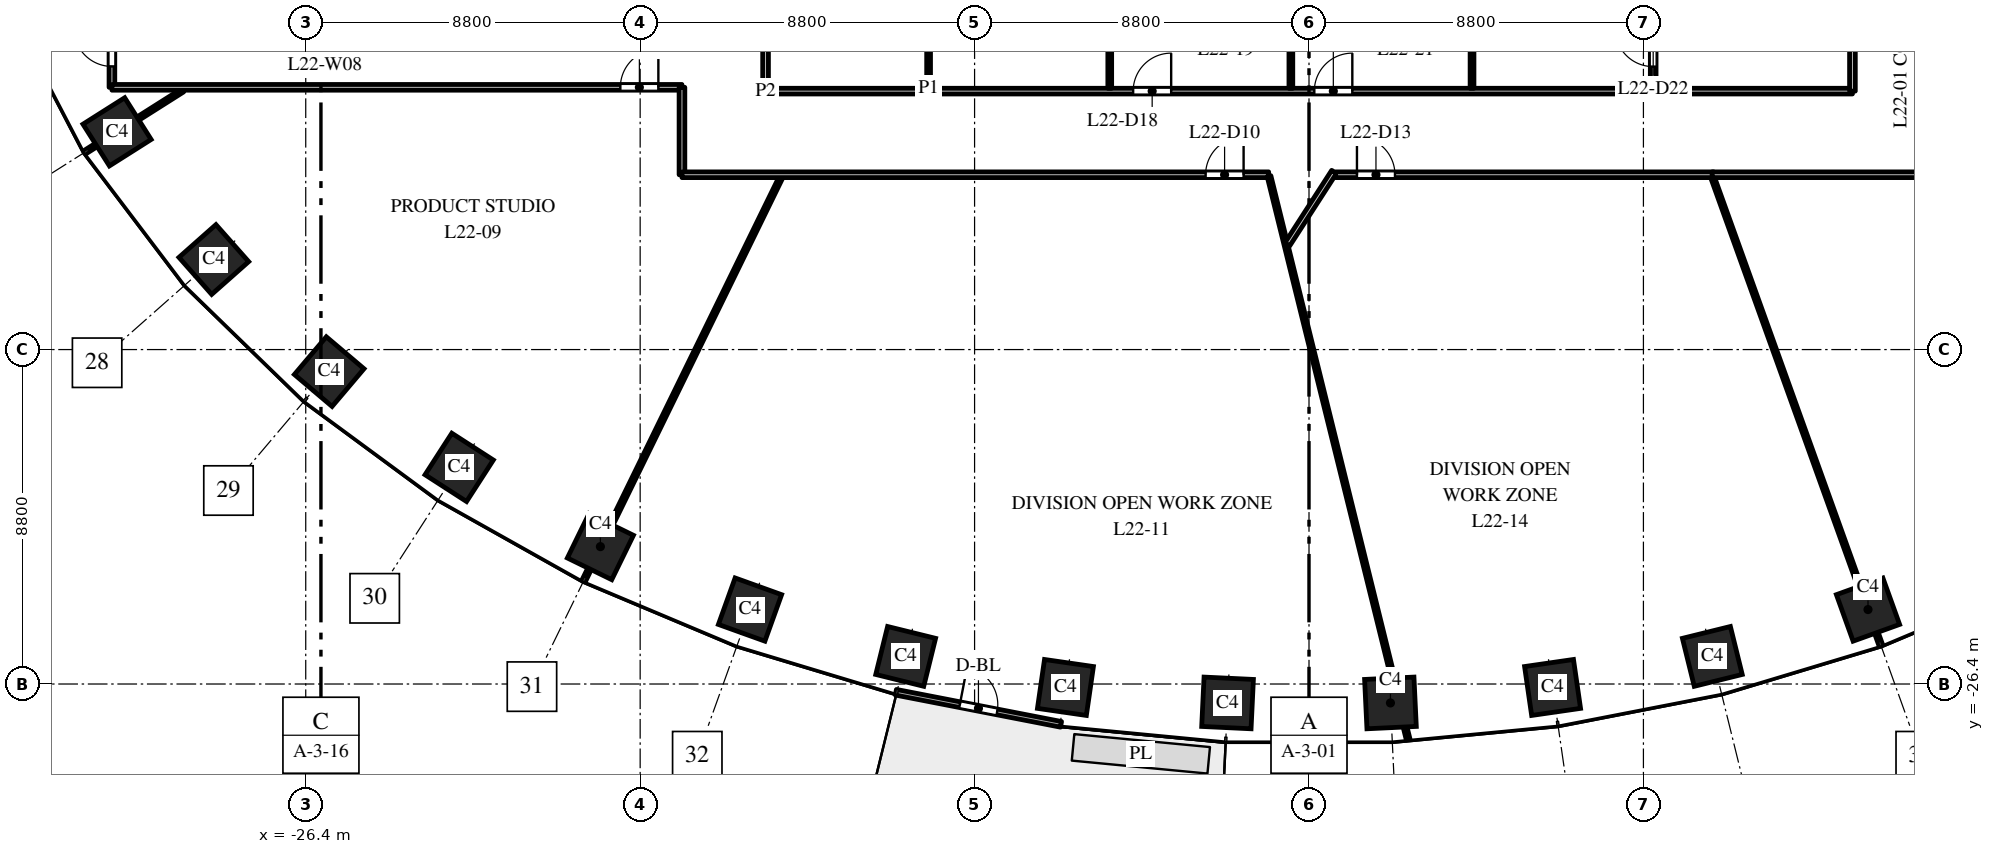
"""IFC4 building model, lengths in metres.
Left out: names, types, materials, properties, quantities, classifications, styles, units other than length and angle.
Written with IfcOpenShell. Run it as: python <this file> out.ifc"""

import sys

from ifc_helpers import new_model, si_unit, direction, frame, frame_2d, origin, origin_2d, place, context, subcontext, project, spatial, rectangle, extrude, element, fill, save


model = new_model("IFC4")
c1 = context("Model", 3, precision=1e-05, world=origin(), true_north=direction((0.0, 1.0)))
c2 = subcontext(c1, "Body", "Model", "MODEL_VIEW")
j1 = project(units=[si_unit("LENGTHUNIT", "METRE"), si_unit("PLANEANGLEUNIT", "RADIAN")], contexts=[c1])
p1 = place(None, origin())
s1 = spatial("IfcSite", under=j1, at=p1, CompositionType="ELEMENT")
p2 = place(p1, origin())
s2 = spatial("IfcBuilding", under=s1, at=p2, CompositionType="ELEMENT")
p3 = place(p2, frame((0.0, 0.0, 100.0)))
s3 = spatial("IfcBuildingStorey", under=s2, at=p3, CompositionType="ELEMENT", Elevation=100.0)
for number, where, z_axis, x_axis in (
    (1, (-31.365, -11.871, 0.0), (0.0, 0.0, 1.0), (0.535, -0.845, 0.0)),
    (2, (-28.819, -15.23, 0.0), (0.0, 0.0, 1.0), (0.663, -0.749, 0.0)),
    (3, (-25.783, -18.18, 0.0), (0.0, 0.0, 1.0), (0.763, -0.646, 0.0)),
    (4, (-22.362, -20.7, 0.0), (0.0, 0.0, 1.0), (0.84, -0.542, 0.0)),
    (5, (-18.646, -22.785, 0.0), (0.0, 0.0, 1.0), (0.898, -0.439, 0.0)),
    (6, (-14.709, -24.441, 0.0), (0.0, 0.0, 1.0), (0.941, -0.338, 0.0)),
    (7, (-10.613, -25.674, 0.0), (0.0, 0.0, 1.0), (0.971, -0.24, 0.0)),
    (8, (-6.409, -26.491, 0.0), (0.0, 0.0, 1.0), (0.99, -0.143, 0.0)),
    (9, (-2.143, -26.898, 0.0), (0.0, 0.0, 1.0), (0.999, -0.048, 0.0)),
    (10, (2.143, -26.898, 0.0), (0.0, 0.0, 1.0), (0.999, 0.048, 0.0)),
    (11, (6.409, -26.491, 0.0), (0.0, 0.0, 1.0), (0.99, 0.143, 0.0)),
    (12, (10.613, -25.674, 0.0), (0.0, 0.0, 1.0), (0.971, 0.24, 0.0)),
    (13, (14.709, -24.441, 0.0), (0.0, 0.0, 1.0), (0.941, 0.338, 0.0)),
):
    element("IfcColumn", number, at=place(p3, frame(where, z_axis=z_axis, x_axis=x_axis)), inside=s3, PredefinedType="COLUMN", context=c2, shape_type="SweptSolid", body=[
        extrude(rectangle(XDim=1.3, YDim=1.3, at=origin_2d()), origin(), (0.0, 0.0, 1.0), 4.0),
    ])
p4 = place(p3, frame((-10.871, -26.617, 0.0), z_axis=(0.0, 0.0, 1.0), x_axis=(0.981631174778, -0.190788460615, 0.0)))
e14 = element("IfcWall", 14, at=p4, inside=s3, PredefinedType="STANDARD", context=c2, shape_type="SweptSolid", body=[
    extrude(rectangle(XDim=4.426, YDim=0.15, at=frame_2d((2.213, 0.0))), origin(), (0.0, 0.0, 1.0), 3.7),
])
p5 = place(p4, frame((1.713, 0.0, 0.0)))
e15 = element("IfcOpeningElement", 15, at=p5, cuts=e14, PredefinedType="OPENING", context=c2, shape_type="SweptSolid", body=[
    extrude(rectangle(XDim=1.0, YDim=2.4, at=frame_2d((0.5, 1.2))), frame((0.0, 0.085, 0.0), z_axis=(0.0, -1.0, 0.0), x_axis=(1.0, 0.0, 0.0)), (0.0, 0.0, 1.0), 0.17),
])
p6 = place(p3, frame((-32.212, -12.408, 0.0), z_axis=(0.0, 0.0, 1.0), x_axis=(0.844810627195, 0.535065420467, 0.0)))
e16 = element("IfcWall", 16, at=p6, inside=s3, PredefinedType="PARTITIONING", context=c2, shape_type="SweptSolid", body=[
    extrude(rectangle(XDim=3.048, YDim=0.1, at=frame_2d((1.524, 0.0))), origin(), (0.0, 0.0, 1.0), 3.7),
])
p7 = place(p3, frame((-31.5, -10.7, 0.0), z_axis=(0.0, 0.0, 1.0), x_axis=(0.0, 1.0, 0.0)))
e17 = element("IfcWall", 17, at=p7, inside=s3, PredefinedType="PARTITIONING", context=c2, shape_type="SweptSolid", body=[
    extrude(rectangle(XDim=2.2, YDim=0.15, at=frame_2d((1.1, 0.0))), origin(), (0.0, 0.0, 1.0), 3.7),
])
p8 = place(p7, frame((0.55, 0.0, 0.0)))
e18 = element("IfcOpeningElement", 18, at=p8, cuts=e17, PredefinedType="OPENING", context=c2, shape_type="SweptSolid", body=[
    extrude(rectangle(XDim=1.0, YDim=2.1, at=frame_2d((0.5, 1.05))), frame((0.0, 0.085, 0.0), z_axis=(0.0, -1.0, 0.0), x_axis=(1.0, 0.0, 0.0)), (0.0, 0.0, 1.0), 0.17),
])
p9 = place(p3, frame((-31.5, -10.7, 0.0), z_axis=(0.0, 0.0, 1.0), x_axis=(1.0, 0.0, 0.0)))
e19 = element("IfcWall", 19, at=p9, inside=s3, PredefinedType="PARTITIONING", context=c2, shape_type="SweptSolid", body=[
    extrude(rectangle(XDim=15.0, YDim=0.15, at=frame_2d((7.5, 0.0))), origin(), (0.0, 0.0, 1.0), 3.1),
])
p10 = place(p9, frame((13.379, 0.0, 0.0)))
e20 = element("IfcOpeningElement", 20, at=p10, cuts=e19, PredefinedType="OPENING", context=c2, shape_type="SweptSolid", body=[
    extrude(rectangle(XDim=1.0, YDim=2.1, at=frame_2d((0.5, 1.05))), frame((0.0, 0.085, 0.0), z_axis=(0.0, -1.0, 0.0), x_axis=(1.0, 0.0, 0.0)), (0.0, 0.0, 1.0), 0.17),
])
p11 = place(p3, frame((-19.086, -23.685, 0.0), z_axis=(0.0, 0.0, 1.0), x_axis=(0.439199750603, 0.898389436197, 0.0)))
e21 = element("IfcWall", 21, at=p11, inside=s3, PredefinedType="PARTITIONING", context=c2, shape_type="SweptSolid", body=[
    extrude(rectangle(XDim=11.81, YDim=0.1, at=frame_2d((5.905, 0.0))), origin(), (0.0, 0.0, 1.0), 3.7),
])
p12 = place(p3, frame((-16.5, -13.0, 0.0), z_axis=(0.0, 0.0, 1.0), x_axis=(0.0, 1.0, 0.0)))
e22 = element("IfcWall", 22, at=p12, inside=s3, PredefinedType="PARTITIONING", context=c2, shape_type="SweptSolid", body=[
    extrude(rectangle(XDim=2.3, YDim=0.15, at=frame_2d((1.15, 0.0))), origin(), (0.0, 0.0, 1.0), 2.75),
])
p13 = place(p3, frame((-16.5, -13.0, 0.0), z_axis=(0.0, 0.0, 1.0), x_axis=(1.0, 0.0, 0.0)))
e23 = element("IfcWall", 23, at=p13, inside=s3, PredefinedType="PARTITIONING", context=c2, shape_type="SweptSolid", body=[
    extrude(rectangle(XDim=15.439, YDim=0.15, at=frame_2d((7.719, 0.0))), origin(), (0.0, 0.0, 1.0), 2.85),
])
p14 = place(p13, frame((13.779, 0.0, 0.0)))
e24 = element("IfcOpeningElement", 24, at=p14, cuts=e23, PredefinedType="OPENING", context=c2, shape_type="SweptSolid", body=[
    extrude(rectangle(XDim=1.0, YDim=2.1, at=frame_2d((0.5, 1.05))), frame((0.0, 0.085, 0.0), z_axis=(0.0, -1.0, 0.0), x_axis=(1.0, 0.0, 0.0)), (0.0, 0.0, 1.0), 0.17),
])
p15 = place(p3, frame((-14.3, -10.8, 0.0), z_axis=(0.0, 0.0, 1.0), x_axis=(0.0, 1.0, 0.0)))
e25 = element("IfcWall", 25, at=p15, inside=s3, PredefinedType="PARTITIONING", context=c2, shape_type="SweptSolid", body=[
    extrude(rectangle(XDim=21.6, YDim=0.15, at=frame_2d((10.8, 0.0))), origin(), (0.0, 0.0, 1.0), 2.75),
])
p16 = place(p15, frame((19.9, 0.0, 0.0)))
e26 = element("IfcOpeningElement", 26, at=p16, cuts=e25, PredefinedType="OPENING", context=c2, shape_type="SweptSolid", body=[
    extrude(rectangle(XDim=1.0, YDim=2.1, at=frame_2d((0.5, 1.05))), frame((0.0, 0.085, 0.0), z_axis=(0.0, -1.0, 0.0), x_axis=(1.0, 0.0, 0.0)), (0.0, 0.0, 1.0), 0.17),
])
p17 = place(p3, frame((-14.3, -10.8, 0.0), z_axis=(0.0, 0.0, 1.0), x_axis=(1.0, 0.0, 0.0)))
e27 = element("IfcWall", 27, at=p17, inside=s3, PredefinedType="PARTITIONING", context=c2, shape_type="SweptSolid", body=[
    extrude(rectangle(XDim=28.6, YDim=0.15, at=frame_2d((14.3, 0.0))), origin(), (0.0, 0.0, 1.0), 2.85),
])
p18 = place(p17, frame((9.673, 0.0, 0.0)))
e28 = element("IfcOpeningElement", 28, at=p18, cuts=e27, PredefinedType="OPENING", context=c2, shape_type="SweptSolid", body=[
    extrude(rectangle(XDim=1.0, YDim=2.1, at=frame_2d((0.5, 1.05))), frame((0.0, 0.085, 0.0), z_axis=(0.0, -1.0, 0.0), x_axis=(1.0, 0.0, 0.0)), (0.0, 0.0, 1.0), 0.17),
])
p19 = place(p17, frame((14.44, 0.0, 0.0)))
e29 = element("IfcOpeningElement", 29, at=p19, cuts=e27, PredefinedType="OPENING", context=c2, shape_type="SweptSolid", body=[
    extrude(rectangle(XDim=1.0, YDim=2.1, at=frame_2d((0.5, 1.05))), frame((0.0, 0.085, 0.0), z_axis=(0.0, -1.0, 0.0), x_axis=(1.0, 0.0, 0.0)), (0.0, 0.0, 1.0), 0.17),
])
p20 = place(p3, frame((-10.01, -10.725, 0.0), z_axis=(0.0, 0.0, 1.0), x_axis=(0.0, 1.0, 0.0)))
e30 = element("IfcWall", 30, at=p20, inside=s3, PredefinedType="PARTITIONING", context=c2, shape_type="SweptSolid", body=[
    extrude(rectangle(XDim=21.45, YDim=0.1, at=frame_2d((10.725, 0.0))), origin(), (0.0, 0.0, 1.0), 2.75),
])
p21 = place(p3, frame((-5.243, -10.725, 0.0), z_axis=(0.0, 0.0, 1.0), x_axis=(0.0, 1.0, 0.0)))
e31 = element("IfcWall", 31, at=p21, inside=s3, PredefinedType="PARTITIONING", context=c2, shape_type="SweptSolid", body=[
    extrude(rectangle(XDim=4.666, YDim=0.1, at=frame_2d((2.333, 0.0))), origin(), (0.0, 0.0, 1.0), 2.9),
])
p22 = place(p3, frame((-1.052, -13.036, 0.0), z_axis=(0.0, 0.0, 1.0), x_axis=(0.239784207917, -0.97082621186, 0.0)))
e32 = element("IfcWall", 32, at=p22, inside=s3, PredefinedType="PARTITIONING", context=c2, shape_type="SweptSolid", body=[
    extrude(rectangle(XDim=15.267, YDim=0.1, at=frame_2d((7.634, 0.0))), origin(), (0.0, 0.0, 1.0), 2.85),
])
p23 = place(p3, frame((-0.477, -10.725, 0.0), z_axis=(0.0, 0.0, 1.0), x_axis=(0.0, 1.0, 0.0)))
e33 = element("IfcWall", 33, at=p23, inside=s3, PredefinedType="PARTITIONING", context=c2, shape_type="SweptSolid", body=[
    extrude(rectangle(XDim=3.257, YDim=0.1, at=frame_2d((1.628, 0.0))), origin(), (0.0, 0.0, 1.0), 2.9),
])
p24 = place(p3, frame((-0.571, -14.832, 0.0), z_axis=(0.0, 0.0, 1.0), x_axis=(0.542327752696, 0.840167012358, 0.0)))
e34 = element("IfcWall", 34, at=p24, inside=s3, PredefinedType="PARTITIONING", context=c2, shape_type="SweptSolid", body=[
    extrude(rectangle(XDim=2.27, YDim=0.15, at=frame_2d((1.135, 0.0))), origin(), (0.0, 0.0, 1.0), 3.7),
])
p25 = place(p3, frame((0.701, -13.0, 0.0), z_axis=(0.0, 0.0, 1.0), x_axis=(1.0, 0.0, 0.0)))
e35 = element("IfcWall", 35, at=p25, inside=s3, PredefinedType="PARTITIONING", context=c2, shape_type="SweptSolid", body=[
    extrude(rectangle(XDim=9.947, YDim=0.15, at=frame_2d((4.974, 0.0))), origin(), (0.0, 0.0, 1.0), 2.85),
])
p26 = place(p25, frame((0.561, 0.0, 0.0)))
e36 = element("IfcOpeningElement", 36, at=p26, cuts=e35, PredefinedType="OPENING", context=c2, shape_type="SweptSolid", body=[
    extrude(rectangle(XDim=1.0, YDim=2.1, at=frame_2d((0.5, 1.05))), frame((0.0, 0.085, 0.0), z_axis=(0.0, -1.0, 0.0), x_axis=(1.0, 0.0, 0.0)), (0.0, 0.0, 1.0), 0.17),
])
p27 = place(p3, frame((4.29, -10.725, 0.0), z_axis=(0.0, 0.0, 1.0), x_axis=(0.0, 1.0, 0.0)))
e37 = element("IfcWall", 37, at=p27, inside=s3, PredefinedType="PARTITIONING", context=c2, shape_type="SweptSolid", body=[
    extrude(rectangle(XDim=4.157, YDim=0.1, at=frame_2d((2.079, 0.0))), origin(), (0.0, 0.0, 1.0), 2.9),
])
p28 = place(p3, frame((9.057, -10.725, 0.0), z_axis=(0.0, 0.0, 1.0), x_axis=(0.0, 1.0, 0.0)))
e38 = element("IfcWall", 38, at=p28, inside=s3, PredefinedType="PARTITIONING", context=c2, shape_type="SweptSolid", body=[
    extrude(rectangle(XDim=10.68, YDim=0.15, at=frame_2d((5.34, 0.0))), origin(), (0.0, 0.0, 1.0), 2.75),
])
p29 = place(p28, frame((0.57, 0.0, 0.0)))
e39 = element("IfcOpeningElement", 39, at=p29, cuts=e38, PredefinedType="OPENING", context=c2, shape_type="SweptSolid", body=[
    extrude(rectangle(XDim=1.0, YDim=2.1, at=frame_2d((0.5, 1.05))), frame((0.0, 0.085, 0.0), z_axis=(0.0, -1.0, 0.0), x_axis=(1.0, 0.0, 0.0)), (0.0, 0.0, 1.0), 0.17),
])
p30 = place(p3, frame((10.622, -13.075, 0.0), z_axis=(0.0, 0.0, 1.0), x_axis=(0.338388305095, -0.941006564788, 0.0)))
e40 = element("IfcWall", 40, at=p30, inside=s3, PredefinedType="PARTITIONING", context=c2, shape_type="SweptSolid", body=[
    extrude(rectangle(XDim=13.08, YDim=0.1, at=frame_2d((6.54, 0.0))), origin(), (0.0, 0.0, 1.0), 2.85),
])
p31 = place(p3, frame((10.607, -13.0, 0.0), z_axis=(0.0, 0.0, 1.0), x_axis=(1.0, 0.0, 0.0)))
e41 = element("IfcWall", 41, at=p31, inside=s3, PredefinedType="PARTITIONING", context=c2, shape_type="SweptSolid", body=[
    extrude(rectangle(XDim=5.893, YDim=0.15, at=frame_2d((2.947, 0.0))), origin(), (0.0, 0.0, 1.0), 3.7),
])
p32 = place(p3, frame((14.3, -10.8, 0.0), z_axis=(0.0, 0.0, 1.0), x_axis=(0.0, 1.0, 0.0)))
e42 = element("IfcWall", 42, at=p32, inside=s3, PredefinedType="PARTITIONING", context=c2, shape_type="SweptSolid", body=[
    extrude(rectangle(XDim=21.6, YDim=0.15, at=frame_2d((10.8, 0.0))), origin(), (0.0, 0.0, 1.0), 2.75),
])
p33 = place(p32, frame((19.95, 0.0, 0.0)))
e43 = element("IfcOpeningElement", 43, at=p33, cuts=e42, PredefinedType="OPENING", context=c2, shape_type="SweptSolid", body=[
    extrude(rectangle(XDim=1.0, YDim=2.1, at=frame_2d((0.5, 1.05))), frame((0.0, 0.085, 0.0), z_axis=(0.0, -1.0, 0.0), x_axis=(1.0, 0.0, 0.0)), (0.0, 0.0, 1.0), 0.17),
])
p34 = place(p5, origin())
e44 = element("IfcDoor", 44, at=p34, inside=s3, OperationType="SINGLE_SWING_LEFT", PredefinedType="DOOR", context=c2, shape_type="SweptSolid", body=[
    extrude(rectangle(XDim=1.0, YDim=2.4, at=frame_2d((0.5, 1.2))), frame((0.0, 0.025, 0.0), z_axis=(0.0, -1.0, 0.0), x_axis=(1.0, 0.0, 0.0)), (0.0, 0.0, 1.0), 0.05),
])
fill(e15, e44)
p35 = place(p8, origin())
e45 = element("IfcDoor", 45, at=p35, inside=s3, OperationType="SINGLE_SWING_RIGHT", PredefinedType="DOOR", context=c2, shape_type="SweptSolid", body=[
    extrude(rectangle(XDim=1.0, YDim=2.1, at=frame_2d((0.5, 1.05))), frame((0.0, 0.025, 0.0), z_axis=(0.0, -1.0, 0.0), x_axis=(1.0, 0.0, 0.0)), (0.0, 0.0, 1.0), 0.05),
])
fill(e18, e45)
p36 = place(p10, origin())
e46 = element("IfcDoor", 46, at=p36, inside=s3, OperationType="SINGLE_SWING_RIGHT", PredefinedType="DOOR", context=c2, shape_type="SweptSolid", body=[
    extrude(rectangle(XDim=1.0, YDim=2.1, at=frame_2d((0.5, 1.05))), frame((0.0, 0.025, 0.0), z_axis=(0.0, -1.0, 0.0), x_axis=(1.0, 0.0, 0.0)), (0.0, 0.0, 1.0), 0.05),
])
fill(e20, e46)
p37 = place(p14, origin())
e47 = element("IfcDoor", 47, at=p37, inside=s3, OperationType="SINGLE_SWING_RIGHT", PredefinedType="DOOR", context=c2, shape_type="SweptSolid", body=[
    extrude(rectangle(XDim=1.0, YDim=2.1, at=frame_2d((0.5, 1.05))), frame((0.0, 0.025, 0.0), z_axis=(0.0, -1.0, 0.0), x_axis=(1.0, 0.0, 0.0)), (0.0, 0.0, 1.0), 0.05),
])
fill(e24, e47)
p38 = place(p26, origin())
e48 = element("IfcDoor", 48, at=p38, inside=s3, OperationType="SINGLE_SWING_LEFT", PredefinedType="DOOR", context=c2, shape_type="SweptSolid", body=[
    extrude(rectangle(XDim=1.0, YDim=2.1, at=frame_2d((0.5, 1.05))), frame((0.0, 0.025, 0.0), z_axis=(0.0, -1.0, 0.0), x_axis=(1.0, 0.0, 0.0)), (0.0, 0.0, 1.0), 0.05),
])
fill(e36, e48)
p39 = place(p18, origin())
e49 = element("IfcDoor", 49, at=p39, inside=s3, OperationType="SINGLE_SWING_RIGHT", PredefinedType="DOOR", context=c2, shape_type="SweptSolid", body=[
    extrude(rectangle(XDim=1.0, YDim=2.1, at=frame_2d((0.5, 1.05))), frame((0.0, 0.025, 0.0), z_axis=(0.0, -1.0, 0.0), x_axis=(1.0, 0.0, 0.0)), (0.0, 0.0, 1.0), 0.05),
])
fill(e28, e49)
p40 = place(p19, origin())
e50 = element("IfcDoor", 50, at=p40, inside=s3, OperationType="SINGLE_SWING_RIGHT", PredefinedType="DOOR", context=c2, shape_type="SweptSolid", body=[
    extrude(rectangle(XDim=1.0, YDim=2.1, at=frame_2d((0.5, 1.05))), frame((0.0, 0.025, 0.0), z_axis=(0.0, -1.0, 0.0), x_axis=(1.0, 0.0, 0.0)), (0.0, 0.0, 1.0), 0.05),
])
fill(e29, e50)
p41 = place(p29, origin())
e51 = element("IfcDoor", 51, at=p41, inside=s3, OperationType="SINGLE_SWING_RIGHT", PredefinedType="DOOR", context=c2, shape_type="SweptSolid", body=[
    extrude(rectangle(XDim=1.0, YDim=2.1, at=frame_2d((0.5, 1.05))), frame((0.0, 0.025, 0.0), z_axis=(0.0, -1.0, 0.0), x_axis=(1.0, 0.0, 0.0)), (0.0, 0.0, 1.0), 0.05),
])
fill(e39, e51)
save(model, sys.argv[1])
